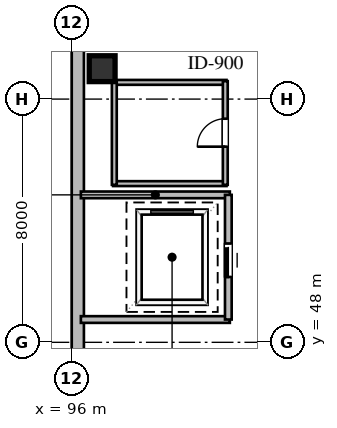
"""IFC4 building model, lengths in metres.
Left out: names, types, materials, properties, quantities, classifications, styles, units other than length and angle.
Written with IfcOpenShell. Run it as: python <this file> out.ifc"""

import sys

from ifc_helpers import new_model, si_unit, direction, frame, frame_2d, origin, origin_2d, place, context, subcontext, project, spatial, rectangle, extrude, element, fill, save


model = new_model("IFC4")
c1 = context("Model", 3, precision=1e-05, world=origin(), true_north=direction((0.0, 1.0)))
c2 = subcontext(c1, "Body", "Model", "MODEL_VIEW")
j1 = project(units=[si_unit("LENGTHUNIT", "METRE"), si_unit("PLANEANGLEUNIT", "RADIAN")], contexts=[c1])
p1 = place(None, origin())
s1 = spatial("IfcSite", under=j1, at=p1, CompositionType="ELEMENT")
p2 = place(p1, origin())
s2 = spatial("IfcBuilding", under=s1, at=p2, CompositionType="ELEMENT")
p3 = place(p2, frame((0.0, 0.0, 4.8)))
s3 = spatial("IfcBuildingStorey", under=s2, at=p3, CompositionType="ELEMENT", Elevation=4.8)
p4 = place(p3, frame((97.0, 57.0, 0.0), z_axis=(0.0, 0.0, 1.0), x_axis=(1.0, 0.0, 0.0)))
e1 = element("IfcColumn", 1, at=p4, inside=s3, PredefinedType="COLUMN", context=c2, shape_type="SweptSolid", body=[
    extrude(rectangle(XDim=0.85, YDim=0.85, at=origin_2d()), origin(), (0.0, 0.0, 1.0), 4.8),
])
p5 = place(p3, frame((96.2, 57.8, 0.0), z_axis=(0.0, 0.0, 1.0), x_axis=(0.0, -1.0, 0.0)))
e2 = element("IfcWall", 2, at=p5, inside=s3, PredefinedType="STANDARD", context=c2, shape_type="SweptSolid", body=[
    extrude(rectangle(XDim=15.8, YDim=0.4, at=frame_2d((7.9, 0.0))), origin(), (0.0, 0.0, 1.0), 4.52),
])
for number, where, z_axis, x_axis in (
    (3, (96.3, 52.85, 0.0), (0.0, 0.0, 1.0), (1.0, 0.0, 0.0)),
    (4, (96.3, 48.75, 0.0), (0.0, 0.0, 1.0), (1.0, 0.0, 0.0)),
):
    element("IfcWall", number, at=place(p3, frame(where, z_axis=z_axis, x_axis=x_axis)), inside=s3, PredefinedType="SOLIDWALL", context=c2, shape_type="SweptSolid", body=[
        extrude(rectangle(XDim=4.9, YDim=0.22, at=frame_2d((2.45, 0.0))), origin(), (0.0, 0.0, 1.0), 4.52),
    ])
p6 = place(p3, frame((101.15, 48.75, 0.0), z_axis=(0.0, 0.0, 1.0), x_axis=(0.0, 1.0, 0.0)))
e5 = element("IfcWall", 5, at=p6, inside=s3, PredefinedType="SOLIDWALL", context=c2, shape_type="SweptSolid", body=[
    extrude(rectangle(XDim=4.1, YDim=0.22, at=frame_2d((2.05, 0.0))), origin(), (0.0, 0.0, 1.0), 4.52),
])
p7 = place(p6, frame((1.4, 0.0, 0.0)))
e6 = element("IfcOpeningElement", 6, at=p7, cuts=e5, PredefinedType="OPENING", context=c2, shape_type="SweptSolid", body=[
    extrude(rectangle(XDim=1.1, YDim=2.1, at=frame_2d((0.55, 1.05))), frame((0.0, 0.12, 0.0), z_axis=(0.0, -1.0, 0.0), x_axis=(1.0, 0.0, 0.0)), (0.0, 0.0, 1.0), 0.24),
])
p8 = place(p3, frame((97.36, 53.22, 0.0), z_axis=(0.0, 0.0, 1.0), x_axis=(1.0, 0.0, 0.0)))
e7 = element("IfcWall", 7, at=p8, inside=s3, PredefinedType="PLUMBINGWALL", context=c2, shape_type="SweptSolid", body=[
    extrude(rectangle(XDim=3.73, YDim=0.16, at=frame_2d((1.865, 0.0))), origin(), (0.0, 0.0, 1.0), 4.52),
])
p9 = place(p3, frame((97.36, 56.55, 0.0), z_axis=(0.0, 0.0, 1.0), x_axis=(1.0, 0.0, 0.0)))
e8 = element("IfcWall", 8, at=p9, inside=s3, PredefinedType="PLUMBINGWALL", context=c2, shape_type="SweptSolid", body=[
    extrude(rectangle(XDim=3.73, YDim=0.16, at=frame_2d((1.865, 0.0))), origin(), (0.0, 0.0, 1.0), 3.899),
])
p10 = place(p3, frame((97.4, 53.18, 0.0), z_axis=(0.0, 0.0, 1.0), x_axis=(0.0, 1.0, 0.0)))
e9 = element("IfcWall", 9, at=p10, inside=s3, PredefinedType="PLUMBINGWALL", context=c2, shape_type="SweptSolid", body=[
    extrude(rectangle(XDim=3.41, YDim=0.16, at=frame_2d((1.705, 0.0))), origin(), (0.0, 0.0, 1.0), 4.093),
])
p11 = place(p3, frame((101.05, 53.18, 0.0), z_axis=(0.0, 0.0, 1.0), x_axis=(0.0, 1.0, 0.0)))
e10 = element("IfcWall", 10, at=p11, inside=s3, PredefinedType="PLUMBINGWALL", context=c2, shape_type="SweptSolid", body=[
    extrude(rectangle(XDim=3.41, YDim=0.16, at=frame_2d((1.705, 0.0))), origin(), (0.0, 0.0, 1.0), 4.52),
])
p12 = place(p11, frame((1.255, 0.0, 0.0)))
e11 = element("IfcOpeningElement", 11, at=p12, cuts=e10, PredefinedType="OPENING", context=c2, shape_type="SweptSolid", body=[
    extrude(rectangle(XDim=0.92, YDim=2.1, at=frame_2d((0.46, 1.05))), frame((0.0, 0.09, 0.0), z_axis=(0.0, -1.0, 0.0), x_axis=(1.0, 0.0, 0.0)), (0.0, 0.0, 1.0), 0.18),
])
p13 = place(p7, origin())
e12 = element("IfcDoor", 12, at=p13, inside=s3, OperationType="SLIDING_TO_LEFT", PredefinedType="DOOR", context=c2, shape_type="SweptSolid", body=[
    extrude(rectangle(XDim=1.1, YDim=2.1, at=frame_2d((0.55, 1.05))), frame((0.0, 0.025, 0.0), z_axis=(0.0, -1.0, 0.0), x_axis=(1.0, 0.0, 0.0)), (0.0, 0.0, 1.0), 0.05),
])
fill(e6, e12)
p14 = place(p12, origin())
e13 = element("IfcDoor", 13, at=p14, inside=s3, OperationType="SINGLE_SWING_LEFT", PredefinedType="DOOR", context=c2, shape_type="SweptSolid", body=[
    extrude(rectangle(XDim=0.92, YDim=2.1, at=frame_2d((0.46, 1.05))), frame((0.0, 0.025, 0.0), z_axis=(0.0, -1.0, 0.0), x_axis=(1.0, 0.0, 0.0)), (0.0, 0.0, 1.0), 0.05),
])
fill(e11, e13)
save(model, sys.argv[1])
